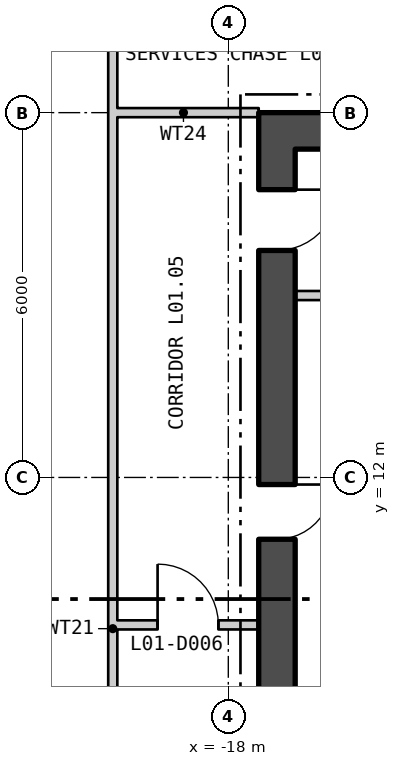
"""IFC4 building model, lengths in metres.
Left out: names, types, materials, properties, quantities, classifications, styles, units other than length and angle.
Written with IfcOpenShell. Run it as: python <this file> out.ifc"""

import sys

from ifc_helpers import new_model, si_unit, direction, frame, frame_2d, origin, place, context, subcontext, project, spatial, rectangle, extrude, element, fill, save


model = new_model("IFC4")
c1 = context("Model", 3, precision=1e-05, world=origin(), true_north=direction((0.0, 1.0)))
c2 = subcontext(c1, "Body", "Model", "MODEL_VIEW")
j1 = project(units=[si_unit("LENGTHUNIT", "METRE"), si_unit("PLANEANGLEUNIT", "RADIAN")], contexts=[c1])
p1 = place(None, origin())
s1 = spatial("IfcSite", under=j1, at=p1, CompositionType="ELEMENT")
p2 = place(p1, origin())
s2 = spatial("IfcBuilding", under=s1, at=p2, CompositionType="ELEMENT")
p3 = place(p2, frame((0.0, 0.0, 8.4)))
s3 = spatial("IfcBuildingStorey", under=s2, at=p3, CompositionType="ELEMENT", Elevation=8.4)
p4 = place(p3, frame((-17.5, 17.7, 0.0), z_axis=(0.0, 0.0, 1.0), x_axis=(1.0, 0.0, 0.0)))
e1 = element("IfcWall", 1, at=p4, inside=s3, PredefinedType="SHEAR", context=c2, shape_type="SweptSolid", body=[
    extrude(rectangle(XDim=35.0, YDim=0.6, at=frame_2d((17.5, 0.0))), origin(), (0.0, 0.0, 1.0), 4.88),
])
p5 = place(p3, frame((-17.2, 0.6, 0.0), z_axis=(0.0, 0.0, 1.0), x_axis=(0.0, 1.0, 0.0)))
e2 = element("IfcWall", 2, at=p5, inside=s3, PredefinedType="SHEAR", context=c2, shape_type="SweptSolid", body=[
    extrude(rectangle(XDim=16.8, YDim=0.6, at=frame_2d((8.4, 0.0))), origin(), (0.0, 0.0, 1.0), 4.88),
])
p6 = place(p5, frame((5.7, 0.0, 0.0)))
e3 = element("IfcOpeningElement", 3, at=p6, cuts=e2, PredefinedType="OPENING", context=c2, shape_type="SweptSolid", body=[
    extrude(rectangle(XDim=1.5, YDim=2.1, at=frame_2d((0.75, 1.05))), frame((0.0, 0.31, 0.0), z_axis=(0.0, -1.0, 0.0), x_axis=(1.0, 0.0, 0.0)), (0.0, 0.0, 1.0), 0.62),
])
p7 = place(p5, frame((1.214, 0.0, 0.0)))
e4 = element("IfcOpeningElement", 4, at=p7, cuts=e2, PredefinedType="OPENING", context=c2, shape_type="SweptSolid", body=[
    extrude(rectangle(XDim=0.9, YDim=2.1, at=frame_2d((0.45, 1.05))), frame((0.0, 0.31, 0.0), z_axis=(0.0, -1.0, 0.0), x_axis=(1.0, 0.0, 0.0)), (0.0, 0.0, 1.0), 0.62),
])
p8 = place(p5, frame((4.064, 0.0, 0.0)))
e5 = element("IfcOpeningElement", 5, at=p8, cuts=e2, PredefinedType="OPENING", context=c2, shape_type="SweptSolid", body=[
    extrude(rectangle(XDim=0.9, YDim=2.1, at=frame_2d((0.45, 1.05))), frame((0.0, 0.31, 0.0), z_axis=(0.0, -1.0, 0.0), x_axis=(1.0, 0.0, 0.0)), (0.0, 0.0, 1.0), 0.62),
])
p9 = place(p5, frame((10.383, 0.0, 0.0)))
e6 = element("IfcOpeningElement", 6, at=p9, cuts=e2, PredefinedType="OPENING", context=c2, shape_type="SweptSolid", body=[
    extrude(rectangle(XDim=0.9, YDim=2.1, at=frame_2d((0.45, 1.05))), frame((0.0, 0.31, 0.0), z_axis=(0.0, -1.0, 0.0), x_axis=(1.0, 0.0, 0.0)), (0.0, 0.0, 1.0), 0.62),
])
p10 = place(p5, frame((15.133, 0.0, 0.0)))
e7 = element("IfcOpeningElement", 7, at=p10, cuts=e2, PredefinedType="OPENING", context=c2, shape_type="SweptSolid", body=[
    extrude(rectangle(XDim=1.0, YDim=2.1, at=frame_2d((0.5, 1.05))), frame((0.0, 0.31, 0.0), z_axis=(0.0, -1.0, 0.0), x_axis=(1.0, 0.0, 0.0)), (0.0, 0.0, 1.0), 0.62),
])
p11 = place(p3, frame((-16.9, 14.992, 0.0), z_axis=(0.0, 0.0, 1.0), x_axis=(1.0, 0.0, 0.0)))
e8 = element("IfcWall", 8, at=p11, inside=s3, PredefinedType="PARTITIONING", context=c2, shape_type="SweptSolid", body=[
    extrude(rectangle(XDim=2.4, YDim=0.15, at=frame_2d((1.2, 0.0))), origin(), (0.0, 0.0, 1.0), 4.88),
])
p12 = place(p3, frame((-19.975, 18.0, 0.0), z_axis=(0.0, 0.0, 1.0), x_axis=(1.0, 0.0, 0.0)))
e9 = element("IfcWall", 9, at=p12, inside=s3, PredefinedType="PARTITIONING", context=c2, shape_type="SweptSolid", body=[
    extrude(rectangle(XDim=2.475, YDim=0.15, at=frame_2d((1.238, 0.0))), origin(), (0.0, 0.0, 1.0), 4.33),
])
p13 = place(p3, frame((-19.9, 1.101, 0.0), z_axis=(0.0, 0.0, 1.0), x_axis=(0.0, 1.0, 0.0)))
e10 = element("IfcWall", 10, at=p13, inside=s3, PredefinedType="PARTITIONING", context=c2, shape_type="SweptSolid", body=[
    extrude(rectangle(XDim=16.824, YDim=0.15, at=frame_2d((8.412, 0.0))), origin(), (0.0, 0.0, 1.0), 4.88),
])
p14 = place(p13, frame((3.567, 0.0, 0.0)))
e11 = element("IfcOpeningElement", 11, at=p14, cuts=e10, PredefinedType="OPENING", context=c2, shape_type="SweptSolid", body=[
    extrude(rectangle(XDim=1.0, YDim=2.1, at=frame_2d((0.5, 1.05))), frame((0.0, 0.085, 0.0), z_axis=(0.0, -1.0, 0.0), x_axis=(1.0, 0.0, 0.0)), (0.0, 0.0, 1.0), 0.17),
])
p15 = place(p3, frame((-19.9, 18.075, 0.0), z_axis=(0.0, 0.0, 1.0), x_axis=(0.0, 1.0, 0.0)))
e12 = element("IfcWall", 12, at=p15, inside=s3, PredefinedType="PARTITIONING", context=c2, shape_type="SweptSolid", body=[
    extrude(rectangle(XDim=1.675, YDim=0.15, at=frame_2d((0.838, 0.0))), origin(), (0.0, 0.0, 1.0), 4.88),
])
p16 = place(p3, frame((-19.825, 9.575, 0.0), z_axis=(0.0, 0.0, 1.0), x_axis=(1.0, 0.0, 0.0)))
e13 = element("IfcWall", 13, at=p16, inside=s3, PredefinedType="PARTITIONING", context=c2, shape_type="SweptSolid", body=[
    extrude(rectangle(XDim=2.325, YDim=0.15, at=frame_2d((1.163, 0.0))), origin(), (0.0, 0.0, 1.0), 4.88),
])
p17 = place(p16, frame((0.662, 0.0, 0.0)))
e14 = element("IfcOpeningElement", 14, at=p17, cuts=e13, PredefinedType="OPENING", context=c2, shape_type="SweptSolid", body=[
    extrude(rectangle(XDim=1.0, YDim=2.1, at=frame_2d((0.5, 1.05))), frame((0.0, 0.085, 0.0), z_axis=(0.0, -1.0, 0.0), x_axis=(1.0, 0.0, 0.0)), (0.0, 0.0, 1.0), 0.17),
])
p18 = place(p9, origin())
e15 = element("IfcDoor", 15, at=p18, inside=s3, OperationType="SINGLE_SWING_RIGHT", PredefinedType="DOOR", context=c2, shape_type="SweptSolid", body=[
    extrude(rectangle(XDim=0.9, YDim=2.1, at=frame_2d((0.45, 1.05))), frame((0.0, 0.025, 0.0), z_axis=(0.0, -1.0, 0.0), x_axis=(1.0, 0.0, 0.0)), (0.0, 0.0, 1.0), 0.05),
])
fill(e6, e15)
p19 = place(p10, origin())
e16 = element("IfcDoor", 16, at=p19, inside=s3, OperationType="SINGLE_SWING_RIGHT", PredefinedType="DOOR", context=c2, shape_type="SweptSolid", body=[
    extrude(rectangle(XDim=1.0, YDim=2.1, at=frame_2d((0.5, 1.05))), frame((0.0, 0.025, 0.0), z_axis=(0.0, -1.0, 0.0), x_axis=(1.0, 0.0, 0.0)), (0.0, 0.0, 1.0), 0.05),
])
fill(e7, e16)
p20 = place(p17, origin())
e17 = element("IfcDoor", 17, at=p20, inside=s3, OperationType="SINGLE_SWING_RIGHT", PredefinedType="DOOR", context=c2, shape_type="SweptSolid", body=[
    extrude(rectangle(XDim=1.0, YDim=2.1, at=frame_2d((0.5, 1.05))), frame((0.0, 0.025, 0.0), z_axis=(0.0, -1.0, 0.0), x_axis=(1.0, 0.0, 0.0)), (0.0, 0.0, 1.0), 0.05),
])
fill(e14, e17)
save(model, sys.argv[1])
